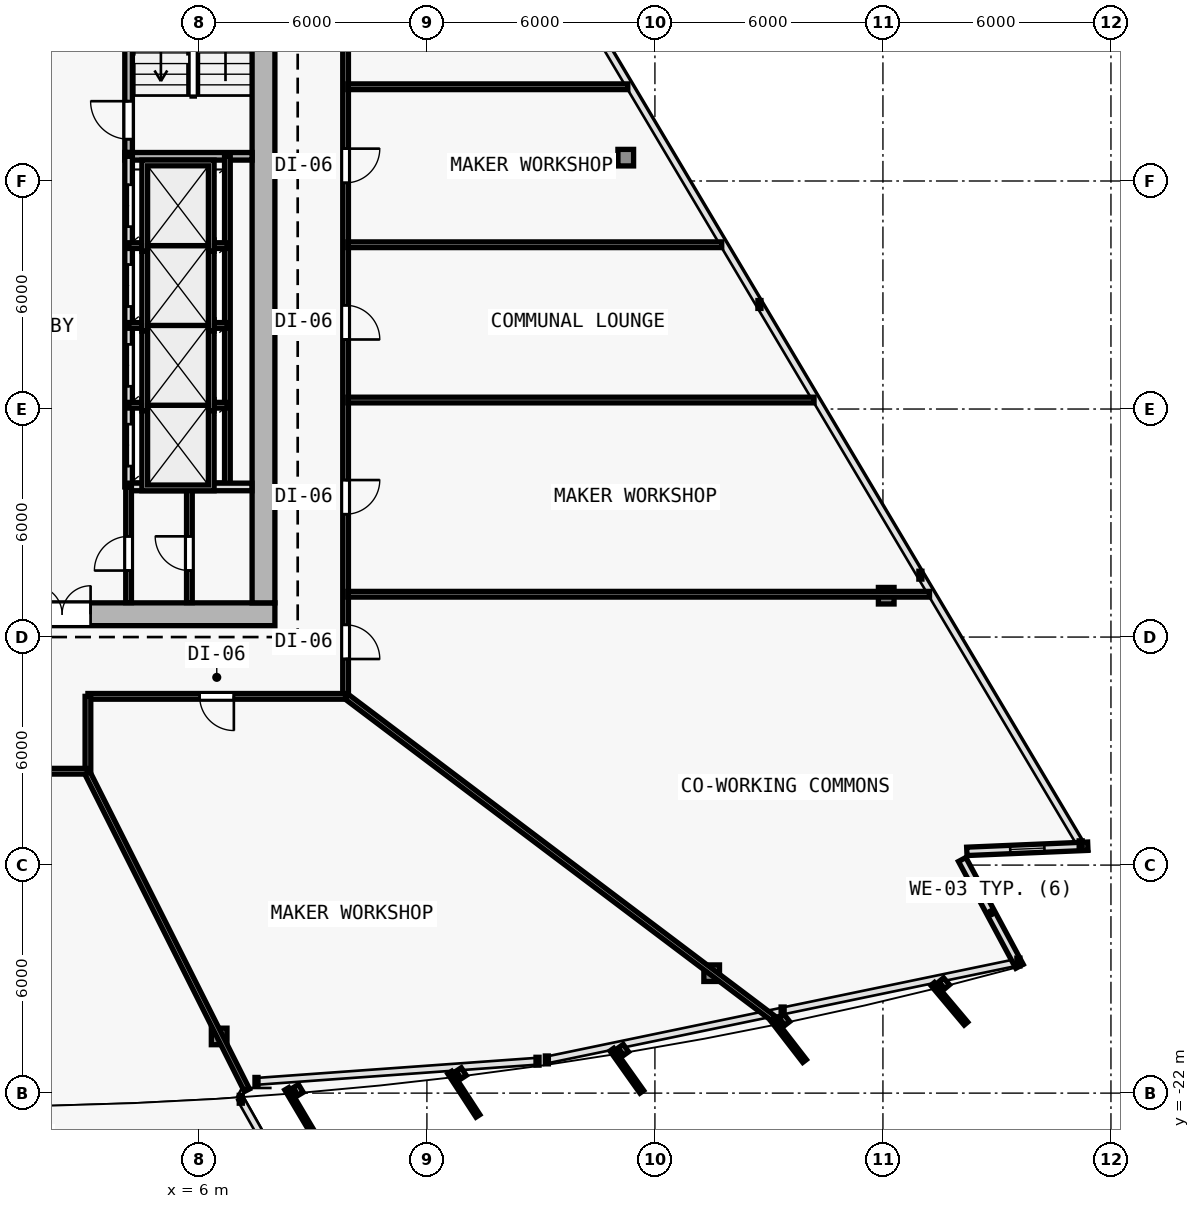
"""IFC4 building model, lengths in metres.
Left out: names, types, materials, properties, quantities, classifications, styles, units other than length and angle.
Written with IfcOpenShell. Run it as: python <this file> out.ifc"""

import sys

from ifc_helpers import new_model, si_unit, direction, frame, frame_2d, origin, origin_2d, place, context, subcontext, project, spatial, rectangle, i_section, extrude, element, fill, save


model = new_model("IFC4")
c1 = context("Model", 3, precision=1e-05, world=origin(), true_north=direction((0.0, 1.0)))
c2 = subcontext(c1, "Body", "Model", "MODEL_VIEW")
j1 = project(units=[si_unit("LENGTHUNIT", "METRE"), si_unit("PLANEANGLEUNIT", "RADIAN")], contexts=[c1])
p1 = place(None, origin())
s1 = spatial("IfcSite", under=j1, at=p1, CompositionType="ELEMENT")
p2 = place(p1, origin())
s2 = spatial("IfcBuilding", under=s1, at=p2, CompositionType="ELEMENT")
p3 = place(p2, frame((0.0, 0.0, 69.6)))
s3 = spatial("IfcBuildingStorey", under=s2, at=p3, CompositionType="ELEMENT", Elevation=69.6)
for number, where, z_axis, x_axis in (
    (1, (7.7, -9.4, 0.0), (0.0, 0.0, 1.0), (1.0, 0.0, 0.0)),
    (2, (7.7, 0.4, 0.0), (0.0, 0.0, 1.0), (1.0, 0.0, 0.0)),
):
    element("IfcColumn", number, at=place(p3, frame(where, z_axis=z_axis, x_axis=x_axis)), inside=s3, PredefinedType="COLUMN", context=c2, shape_type="SweptSolid", body=[
        extrude(i_section(OverallWidth=0.416, OverallDepth=0.446, WebThickness=0.025, FlangeThickness=0.04, FilletRadius=0.015, at=origin_2d()), origin(), (0.0, 0.0, 1.0), 3.6),
    ])
p4 = place(p3, frame((6.533, -20.509, 0.005), z_axis=(-0.006865841702, 0.035280909339, 0.999353850072), x_axis=(-0.981585848295, -0.191021523464, 0.0)))
e3 = element("IfcColumn", 3, at=p4, inside=s3, PredefinedType="COLUMN", context=c2, shape_type="SweptSolid", body=[
    extrude(i_section(OverallWidth=0.412, OverallDepth=0.435, WebThickness=0.023, FlangeThickness=0.037, FilletRadius=0.015, at=origin_2d()), origin(), (0.0, 0.0, 1.0), 3.592),
])
p5 = place(p3, frame((19.494, -18.844, 0.005), z_axis=(-0.020594893987, 0.033509183946, 0.999226193078), x_axis=(-0.851954850327, -0.523615252838, 0.0)))
e4 = element("IfcColumn", 4, at=p5, inside=s3, PredefinedType="COLUMN", context=c2, shape_type="SweptSolid", body=[
    extrude(i_section(OverallWidth=0.412, OverallDepth=0.435, WebThickness=0.023, FlangeThickness=0.037, FilletRadius=0.015, at=origin_2d()), origin(), (0.0, 0.0, 1.0), 3.592),
])
p6 = place(p3, frame((24.086, -8.912, 0.005), z_axis=(-0.026105663043, 0.021618752208, 0.999425396871), x_axis=(-0.637813971185, -0.770190455771, 0.0)))
e5 = element("IfcColumn", 5, at=p6, inside=s3, PredefinedType="COLUMN", context=c2, shape_type="SweptSolid", body=[
    extrude(i_section(OverallWidth=0.412, OverallDepth=0.435, WebThickness=0.023, FlangeThickness=0.037, FilletRadius=0.015, at=origin_2d()), origin(), (0.0, 0.0, 1.0), 3.591),
])
p7 = place(p3, frame((17.233, 2.614, 0.005), z_axis=(-0.018906028715, 0.009589028952, 0.999775281052), x_axis=(-0.452339157861, -0.891845999187, 0.0)))
e6 = element("IfcColumn", 6, at=p7, inside=s3, PredefinedType="COLUMN", context=c2, shape_type="SweptSolid", body=[
    extrude(i_section(OverallWidth=0.412, OverallDepth=0.435, WebThickness=0.023, FlangeThickness=0.037, FilletRadius=0.015, at=origin_2d()), origin(), (0.0, 0.0, 1.0), 3.59),
])
p8 = place(p3, frame((26.086, -15.852, 0.0), z_axis=(0.0, 0.0, 1.0), x_axis=(0.472775670204, -0.881182821929, 0.0)))
e7 = element("IfcWall", 7, at=p8, inside=s3, PredefinedType="SOLIDWALL", context=c2, shape_type="SweptSolid", body=[
    extrude(rectangle(XDim=3.19, YDim=0.22, at=frame_2d((1.595, 0.0))), origin(), (0.0, 0.0, 1.0), 3.28),
])
p9 = place(p3, frame((29.391, -15.503, 0.0), z_axis=(0.0, 0.0, 1.0), x_axis=(-0.999095632957, -0.042519597906, 0.0)))
e8 = element("IfcWall", 8, at=p9, inside=s3, PredefinedType="SOLIDWALL", context=c2, shape_type="SweptSolid", body=[
    extrude(rectangle(XDim=3.187, YDim=0.22, at=frame_2d((1.593, 0.0))), origin(), (0.0, 0.0, 1.0), 3.28),
])
p10 = place(p9, frame((1.143, 0.0, 0.62)))
e9 = element("IfcOpeningElement", 9, at=p10, cuts=e8, PredefinedType="OPENING", context=c2, shape_type="SweptSolid", body=[
    extrude(rectangle(XDim=0.9, YDim=1.6, at=frame_2d((0.45, 0.8))), frame((0.0, 0.12, 0.0), z_axis=(0.0, -1.0, 0.0), x_axis=(1.0, 0.0, 0.0)), (0.0, 0.0, 1.0), 0.24),
])
p11 = place(p3, frame((-8.0, -9.4, 0.0), z_axis=(0.0, 0.0, 1.0), x_axis=(1.0, 0.0, 0.0)))
e10 = element("IfcWall", 10, at=p11, inside=s3, PredefinedType="SHEAR", context=c2, shape_type="SweptSolid", body=[
    extrude(rectangle(XDim=16.0, YDim=0.6, at=frame_2d((8.0, 0.0))), origin(), (0.0, 0.0, 1.0), 3.28),
])
p12 = place(p11, frame((9.65, 0.0, 0.0)))
e11 = element("IfcOpeningElement", 11, at=p12, cuts=e10, PredefinedType="OPENING", context=c2, shape_type="SweptSolid", body=[
    extrude(rectangle(XDim=1.5, YDim=2.2, at=frame_2d((0.75, 1.1))), frame((0.0, 0.31, 0.0), z_axis=(0.0, -1.0, 0.0), x_axis=(1.0, 0.0, 0.0)), (0.0, 0.0, 1.0), 0.62),
])
p13 = place(p3, frame((7.7, 9.9, 0.0), z_axis=(0.0, 0.0, 1.0), x_axis=(0.0, -1.0, 0.0)))
e12 = element("IfcWall", 12, at=p13, inside=s3, PredefinedType="SHEAR", context=c2, shape_type="SweptSolid", body=[
    extrude(rectangle(XDim=19.0, YDim=0.6, at=frame_2d((9.5, 0.0))), origin(), (0.0, 0.0, 1.0), 3.28),
])
p14 = place(p3, frame((4.15, 2.75, 0.0), z_axis=(0.0, 0.0, 1.0), x_axis=(0.0, 1.0, 0.0)))
e13 = element("IfcWall", 13, at=p14, inside=s3, PredefinedType="SOLIDWALL", context=c2, shape_type="SweptSolid", body=[
    extrude(rectangle(XDim=7.15, YDim=0.2, at=frame_2d((3.575, 0.0))), origin(), (0.0, 0.0, 1.0), 3.28),
])
p15 = place(p14, frame((0.35, 0.0, 0.0)))
e14 = element("IfcOpeningElement", 14, at=p15, cuts=e13, PredefinedType="OPENING", context=c2, shape_type="SweptSolid", body=[
    extrude(rectangle(XDim=1.0, YDim=2.15, at=frame_2d((0.5, 1.075))), frame((0.0, 0.11, 0.0), z_axis=(0.0, -1.0, 0.0), x_axis=(1.0, 0.0, 0.0)), (0.0, 0.0, 1.0), 0.22),
])
p16 = place(p3, frame((4.05, 2.65, 0.0), z_axis=(0.0, 0.0, 1.0), x_axis=(1.0, 0.0, 0.0)))
e15 = element("IfcWall", 15, at=p16, inside=s3, PredefinedType="SOLIDWALL", context=c2, shape_type="SweptSolid", body=[
    extrude(rectangle(XDim=3.35, YDim=0.2, at=frame_2d((1.675, 0.0))), origin(), (0.0, 0.0, 1.0), 3.28),
])
p17 = place(p3, frame((4.15, -6.05, 0.0), z_axis=(0.0, 0.0, 1.0), x_axis=(0.0, 1.0, 0.0)))
e16 = element("IfcWall", 16, at=p17, inside=s3, PredefinedType="SOLIDWALL", context=c2, shape_type="SweptSolid", body=[
    extrude(rectangle(XDim=8.7, YDim=0.2, at=frame_2d((4.35, 0.0))), origin(), (0.0, 0.0, 1.0), 3.28),
])
p18 = place(p17, frame((0.55, 0.0, 0.0)))
e17 = element("IfcOpeningElement", 17, at=p18, cuts=e16, PredefinedType="OPENING", context=c2, shape_type="SweptSolid", body=[
    extrude(rectangle(XDim=1.1, YDim=2.15, at=frame_2d((0.55, 1.075))), frame((0.0, 0.11, 0.0), z_axis=(0.0, -1.0, 0.0), x_axis=(1.0, 0.0, 0.0)), (0.0, 0.0, 1.0), 0.22),
])
p19 = place(p17, frame((2.65, 0.0, 0.0)))
e18 = element("IfcOpeningElement", 18, at=p19, cuts=e16, PredefinedType="OPENING", context=c2, shape_type="SweptSolid", body=[
    extrude(rectangle(XDim=1.1, YDim=2.15, at=frame_2d((0.55, 1.075))), frame((0.0, 0.11, 0.0), z_axis=(0.0, -1.0, 0.0), x_axis=(1.0, 0.0, 0.0)), (0.0, 0.0, 1.0), 0.22),
])
p20 = place(p17, frame((4.75, 0.0, 0.0)))
e19 = element("IfcOpeningElement", 19, at=p20, cuts=e16, PredefinedType="OPENING", context=c2, shape_type="SweptSolid", body=[
    extrude(rectangle(XDim=1.1, YDim=2.15, at=frame_2d((0.55, 1.075))), frame((0.0, 0.11, 0.0), z_axis=(0.0, -1.0, 0.0), x_axis=(1.0, 0.0, 0.0)), (0.0, 0.0, 1.0), 0.22),
])
p21 = place(p17, frame((6.85, 0.0, 0.0)))
e20 = element("IfcOpeningElement", 20, at=p21, cuts=e16, PredefinedType="OPENING", context=c2, shape_type="SweptSolid", body=[
    extrude(rectangle(XDim=1.1, YDim=2.15, at=frame_2d((0.55, 1.075))), frame((0.0, 0.11, 0.0), z_axis=(0.0, -1.0, 0.0), x_axis=(1.0, 0.0, 0.0)), (0.0, 0.0, 1.0), 0.22),
])
p22 = place(p3, frame((6.75, -6.05, 0.0), z_axis=(0.0, 0.0, 1.0), x_axis=(0.0, 1.0, 0.0)))
e21 = element("IfcWall", 21, at=p22, inside=s3, PredefinedType="PARTITIONING", context=c2, shape_type="SweptSolid", body=[
    extrude(rectangle(XDim=8.7, YDim=0.15, at=frame_2d((4.35, 0.0))), origin(), (0.0, 0.0, 1.0), 3.28),
])
for number, where, z_axis, x_axis in (
    (22, (4.15, -3.9, 0.0), (0.0, 0.0, 1.0), (1.0, 0.0, 0.0)),
    (23, (4.15, -1.8, 0.0), (0.0, 0.0, 1.0), (1.0, 0.0, 0.0)),
    (24, (4.15, 0.3, 0.0), (0.0, 0.0, 1.0), (1.0, 0.0, 0.0)),
):
    element("IfcWall", number, at=place(p3, frame(where, z_axis=z_axis, x_axis=x_axis)), inside=s3, PredefinedType="PARTITIONING", context=c2, shape_type="SweptSolid", body=[
        extrude(rectangle(XDim=2.6, YDim=0.15, at=frame_2d((1.3, 0.0))), origin(), (0.0, 0.0, 1.0), 3.28),
    ])
p23 = place(p3, frame((4.15, -6.05, 0.0), z_axis=(0.0, 0.0, 1.0), x_axis=(1.0, 0.0, 0.0)))
e25 = element("IfcWall", 25, at=p23, inside=s3, PredefinedType="SOLIDWALL", context=c2, shape_type="SweptSolid", body=[
    extrude(rectangle(XDim=3.245, YDim=0.2, at=frame_2d((1.623, 0.0))), origin(), (0.0, 0.0, 1.0), 3.28),
])
p24 = place(p3, frame((4.15, -9.095, 0.0), z_axis=(0.0, 0.0, 1.0), x_axis=(0.0, 1.0, 0.0)))
e26 = element("IfcWall", 26, at=p24, inside=s3, PredefinedType="PARTITIONING", context=c2, shape_type="SweptSolid", body=[
    extrude(rectangle(XDim=3.045, YDim=0.15, at=frame_2d((1.522, 0.0))), origin(), (0.0, 0.0, 1.0), 3.28),
])
p25 = place(p24, frame((0.845, 0.0, 0.0)))
e27 = element("IfcOpeningElement", 27, at=p25, cuts=e26, PredefinedType="OPENING", context=c2, shape_type="SweptSolid", body=[
    extrude(rectangle(XDim=0.9, YDim=2.1, at=frame_2d((0.45, 1.05))), frame((0.0, 0.085, 0.0), z_axis=(0.0, -1.0, 0.0), x_axis=(1.0, 0.0, 0.0)), (0.0, 0.0, 1.0), 0.17),
])
p26 = place(p3, frame((5.75, -9.095, 0.0), z_axis=(0.0, 0.0, 1.0), x_axis=(0.0, 1.0, 0.0)))
e28 = element("IfcWall", 28, at=p26, inside=s3, PredefinedType="PARTITIONING", context=c2, shape_type="SweptSolid", body=[
    extrude(rectangle(XDim=3.045, YDim=0.15, at=frame_2d((1.522, 0.0))), origin(), (0.0, 0.0, 1.0), 3.28),
])
p27 = place(p26, frame((0.845, 0.0, 0.0)))
e29 = element("IfcOpeningElement", 29, at=p27, cuts=e28, PredefinedType="OPENING", context=c2, shape_type="SweptSolid", body=[
    extrude(rectangle(XDim=0.9, YDim=2.1, at=frame_2d((0.45, 1.05))), frame((0.0, 0.085, 0.0), z_axis=(0.0, -1.0, 0.0), x_axis=(1.0, 0.0, 0.0)), (0.0, 0.0, 1.0), 0.17),
])
p28 = place(p3, frame((9.86, 8.426, 0.0), z_axis=(0.0, 0.0, 1.0), x_axis=(0.0, -1.0, 0.0)))
e30 = element("IfcWall", 30, at=p28, inside=s3, PredefinedType="PARTITIONING", context=c2, shape_type="SweptSolid", body=[
    extrude(rectangle(XDim=19.986, YDim=0.15, at=frame_2d((9.993, 0.0))), origin(), (0.0, 0.0, 1.0), 2.539),
])
p29 = place(p28, frame((18.103, 0.0, 0.0)))
e31 = element("IfcOpeningElement", 31, at=p29, cuts=e30, PredefinedType="OPENING", context=c2, shape_type="SweptSolid", body=[
    extrude(rectangle(XDim=0.9, YDim=2.1, at=frame_2d((0.45, 1.05))), frame((0.0, 0.085, 0.0), z_axis=(0.0, -1.0, 0.0), x_axis=(1.0, 0.0, 0.0)), (0.0, 0.0, 1.0), 0.17),
])
p30 = place(p28, frame((14.294, 0.0, 0.0)))
e32 = element("IfcOpeningElement", 32, at=p30, cuts=e30, PredefinedType="OPENING", context=c2, shape_type="SweptSolid", body=[
    extrude(rectangle(XDim=0.9, YDim=2.1, at=frame_2d((0.45, 1.05))), frame((0.0, 0.085, 0.0), z_axis=(0.0, -1.0, 0.0), x_axis=(1.0, 0.0, 0.0)), (0.0, 0.0, 1.0), 0.17),
])
p31 = place(p28, frame((9.696, 0.0, 0.0)))
e33 = element("IfcOpeningElement", 33, at=p31, cuts=e30, PredefinedType="OPENING", context=c2, shape_type="SweptSolid", body=[
    extrude(rectangle(XDim=0.9, YDim=2.1, at=frame_2d((0.45, 1.05))), frame((0.0, 0.085, 0.0), z_axis=(0.0, -1.0, 0.0), x_axis=(1.0, 0.0, 0.0)), (0.0, 0.0, 1.0), 0.17),
])
p32 = place(p28, frame((5.574, 0.0, 0.0)))
e34 = element("IfcOpeningElement", 34, at=p32, cuts=e30, PredefinedType="OPENING", context=c2, shape_type="SweptSolid", body=[
    extrude(rectangle(XDim=0.9, YDim=2.1, at=frame_2d((0.45, 1.05))), frame((0.0, 0.085, 0.0), z_axis=(0.0, -1.0, 0.0), x_axis=(1.0, 0.0, 0.0)), (0.0, 0.0, 1.0), 0.17),
])
p33 = place(p28, frame((1.612, 0.0, 0.0)))
e35 = element("IfcOpeningElement", 35, at=p33, cuts=e30, PredefinedType="OPENING", context=c2, shape_type="SweptSolid", body=[
    extrude(rectangle(XDim=0.9, YDim=2.1, at=frame_2d((0.45, 1.05))), frame((0.0, 0.085, 0.0), z_axis=(0.0, -1.0, 0.0), x_axis=(1.0, 0.0, 0.0)), (0.0, 0.0, 1.0), 0.17),
])
p34 = place(p3, frame((9.86, -11.56, 0.0), z_axis=(0.0, 0.0, 1.0), x_axis=(-1.0, 0.0, 0.0)))
e36 = element("IfcWall", 36, at=p34, inside=s3, PredefinedType="PARTITIONING", context=c2, shape_type="SweptSolid", body=[
    extrude(rectangle(XDim=6.78, YDim=0.15, at=frame_2d((3.39, 0.0))), origin(), (0.0, 0.0, 1.0), 3.28),
])
p35 = place(p34, frame((2.94, 0.0, 0.0)))
e37 = element("IfcOpeningElement", 37, at=p35, cuts=e36, PredefinedType="OPENING", context=c2, shape_type="SweptSolid", body=[
    extrude(rectangle(XDim=0.9, YDim=2.1, at=frame_2d((0.45, 1.05))), frame((0.0, 0.085, 0.0), z_axis=(0.0, -1.0, 0.0), x_axis=(1.0, 0.0, 0.0)), (0.0, 0.0, 1.0), 0.17),
])
p36 = place(p3, frame((3.08, -11.56, 0.0), z_axis=(0.0, 0.0, 1.0), x_axis=(0.0, -1.0, 0.0)))
e38 = element("IfcWall", 38, at=p36, inside=s3, PredefinedType="PARTITIONING", context=c2, shape_type="SweptSolid", body=[
    extrude(rectangle(XDim=1.97, YDim=0.15, at=frame_2d((0.985, 0.0))), origin(), (0.0, 0.0, 1.0), 2.895),
])
p37 = place(p3, frame((3.08, -13.53, 0.0), z_axis=(0.0, 0.0, 1.0), x_axis=(-1.0, 0.0, 0.0)))
e39 = element("IfcWall", 39, at=p37, inside=s3, PredefinedType="PARTITIONING", context=c2, shape_type="SweptSolid", body=[
    extrude(rectangle(XDim=6.16, YDim=0.15, at=frame_2d((3.08, 0.0))), origin(), (0.0, 0.0, 1.0), 2.655),
])
p38 = place(p37, frame((2.63, 0.0, 0.0)))
e40 = element("IfcOpeningElement", 40, at=p38, cuts=e39, PredefinedType="OPENING", context=c2, shape_type="SweptSolid", body=[
    extrude(rectangle(XDim=0.9, YDim=2.1, at=frame_2d((0.45, 1.05))), frame((0.0, 0.085, 0.0), z_axis=(0.0, -1.0, 0.0), x_axis=(1.0, 0.0, 0.0)), (0.0, 0.0, 1.0), 0.17),
])
p39 = place(p3, frame((3.066, -13.573, 0.0), z_axis=(0.0, 0.0, 1.0), x_axis=(0.449176702064, -0.893442941839, 0.0)))
e41 = element("IfcWall", 41, at=p39, inside=s3, PredefinedType="PARTITIONING", context=c2, shape_type="SweptSolid", body=[
    extrude(rectangle(XDim=9.347, YDim=0.15, at=frame_2d((4.674, 0.0))), origin(), (0.0, 0.0, 1.0), 2.655),
])
p40 = place(p3, frame((9.888, -11.569, 0.0), z_axis=(0.0, 0.0, 1.0), x_axis=(0.79842261679, -0.602097438127, 0.0)))
e42 = element("IfcWall", 42, at=p40, inside=s3, PredefinedType="PARTITIONING", context=c2, shape_type="SweptSolid", body=[
    extrude(rectangle(XDim=14.066, YDim=0.15, at=frame_2d((7.033, 0.0))), origin(), (0.0, 0.0, 1.0), 2.655),
])
p41 = place(p3, frame((9.92, -8.873, 0.0), z_axis=(0.0, 0.0, 1.0), x_axis=(1.0, 0.0, 0.0)))
e43 = element("IfcWall", 43, at=p41, inside=s3, PredefinedType="PARTITIONING", context=c2, shape_type="SweptSolid", body=[
    extrude(rectangle(XDim=15.306, YDim=0.15, at=frame_2d((7.653, 0.0))), origin(), (0.0, 0.0, 1.0), 2.539),
])
p42 = place(p3, frame((9.92, 0.323, 0.0), z_axis=(0.0, 0.0, 1.0), x_axis=(1.0, 0.0, 0.0)))
e44 = element("IfcWall", 44, at=p42, inside=s3, PredefinedType="PARTITIONING", context=c2, shape_type="SweptSolid", body=[
    extrude(rectangle(XDim=9.838, YDim=0.15, at=frame_2d((4.919, 0.0))), origin(), (0.0, 0.0, 1.0), 2.765),
])
p43 = place(p3, frame((9.92, -3.763, 0.0), z_axis=(0.0, 0.0, 1.0), x_axis=(1.0, 0.0, 0.0)))
e45 = element("IfcWall", 45, at=p43, inside=s3, PredefinedType="PARTITIONING", context=c2, shape_type="SweptSolid", body=[
    extrude(rectangle(XDim=12.267, YDim=0.15, at=frame_2d((6.134, 0.0))), origin(), (0.0, 0.0, 1.0), 2.765),
])
p44 = place(p3, frame((9.92, 4.48, 0.0), z_axis=(0.0, 0.0, 1.0), x_axis=(1.0, 0.0, 0.0)))
e46 = element("IfcWall", 46, at=p44, inside=s3, PredefinedType="PARTITIONING", context=c2, shape_type="SweptSolid", body=[
    extrude(rectangle(XDim=7.366, YDim=0.15, at=frame_2d((3.683, 0.0))), origin(), (0.0, 0.0, 1.0), 2.765),
])
p45 = place(p10, origin())
e47 = element("IfcWindow", 47, at=p45, inside=s3, PartitioningType="SINGLE_PANEL", PredefinedType="WINDOW", context=c2, shape_type="SweptSolid", body=[
    extrude(rectangle(XDim=0.9, YDim=1.6, at=frame_2d((0.45, 0.8))), frame((0.0, 0.03, 0.0), z_axis=(0.0, -1.0, 0.0), x_axis=(1.0, 0.0, 0.0)), (0.0, 0.0, 1.0), 0.06),
])
fill(e9, e47)
p46 = place(p12, origin())
e48 = element("IfcDoor", 48, at=p46, inside=s3, OperationType="DOUBLE_DOOR_SINGLE_SWING", PredefinedType="DOOR", context=c2, shape_type="SweptSolid", body=[
    extrude(rectangle(XDim=1.5, YDim=2.2, at=frame_2d((0.75, 1.1))), frame((0.0, 0.025, 0.0), z_axis=(0.0, -1.0, 0.0), x_axis=(1.0, 0.0, 0.0)), (0.0, 0.0, 1.0), 0.05),
])
fill(e11, e48)
p47 = place(p15, origin())
e49 = element("IfcDoor", 49, at=p47, inside=s3, OperationType="SINGLE_SWING_RIGHT", PredefinedType="DOOR", context=c2, shape_type="SweptSolid", body=[
    extrude(rectangle(XDim=1.0, YDim=2.15, at=frame_2d((0.5, 1.075))), frame((0.0, 0.025, 0.0), z_axis=(0.0, -1.0, 0.0), x_axis=(1.0, 0.0, 0.0)), (0.0, 0.0, 1.0), 0.05),
])
fill(e14, e49)
p48 = place(p18, origin())
e50 = element("IfcDoor", 50, at=p48, inside=s3, OperationType="DOUBLE_DOOR_SLIDING", PredefinedType="DOOR", context=c2, shape_type="SweptSolid", body=[
    extrude(rectangle(XDim=1.1, YDim=2.15, at=frame_2d((0.55, 1.075))), frame((0.0, 0.025, 0.0), z_axis=(0.0, -1.0, 0.0), x_axis=(1.0, 0.0, 0.0)), (0.0, 0.0, 1.0), 0.05),
])
fill(e17, e50)
p49 = place(p19, origin())
e51 = element("IfcDoor", 51, at=p49, inside=s3, OperationType="DOUBLE_DOOR_SLIDING", PredefinedType="DOOR", context=c2, shape_type="SweptSolid", body=[
    extrude(rectangle(XDim=1.1, YDim=2.15, at=frame_2d((0.55, 1.075))), frame((0.0, 0.025, 0.0), z_axis=(0.0, -1.0, 0.0), x_axis=(1.0, 0.0, 0.0)), (0.0, 0.0, 1.0), 0.05),
])
fill(e18, e51)
p50 = place(p20, origin())
e52 = element("IfcDoor", 52, at=p50, inside=s3, OperationType="DOUBLE_DOOR_SLIDING", PredefinedType="DOOR", context=c2, shape_type="SweptSolid", body=[
    extrude(rectangle(XDim=1.1, YDim=2.15, at=frame_2d((0.55, 1.075))), frame((0.0, 0.025, 0.0), z_axis=(0.0, -1.0, 0.0), x_axis=(1.0, 0.0, 0.0)), (0.0, 0.0, 1.0), 0.05),
])
fill(e19, e52)
p51 = place(p21, origin())
e53 = element("IfcDoor", 53, at=p51, inside=s3, OperationType="DOUBLE_DOOR_SLIDING", PredefinedType="DOOR", context=c2, shape_type="SweptSolid", body=[
    extrude(rectangle(XDim=1.1, YDim=2.15, at=frame_2d((0.55, 1.075))), frame((0.0, 0.025, 0.0), z_axis=(0.0, -1.0, 0.0), x_axis=(1.0, 0.0, 0.0)), (0.0, 0.0, 1.0), 0.05),
])
fill(e20, e53)
p52 = place(p25, origin())
e54 = element("IfcDoor", 54, at=p52, inside=s3, OperationType="SINGLE_SWING_LEFT", PredefinedType="DOOR", context=c2, shape_type="SweptSolid", body=[
    extrude(rectangle(XDim=0.9, YDim=2.1, at=frame_2d((0.45, 1.05))), frame((0.0, 0.025, 0.0), z_axis=(0.0, -1.0, 0.0), x_axis=(1.0, 0.0, 0.0)), (0.0, 0.0, 1.0), 0.05),
])
fill(e27, e54)
p53 = place(p27, origin())
e55 = element("IfcDoor", 55, at=p53, inside=s3, OperationType="SINGLE_SWING_RIGHT", PredefinedType="DOOR", context=c2, shape_type="SweptSolid", body=[
    extrude(rectangle(XDim=0.9, YDim=2.1, at=frame_2d((0.45, 1.05))), frame((0.0, 0.025, 0.0), z_axis=(0.0, -1.0, 0.0), x_axis=(1.0, 0.0, 0.0)), (0.0, 0.0, 1.0), 0.05),
])
fill(e29, e55)
p54 = place(p35, origin())
e56 = element("IfcDoor", 56, at=p54, inside=s3, OperationType="SINGLE_SWING_LEFT", PredefinedType="DOOR", context=c2, shape_type="SweptSolid", body=[
    extrude(rectangle(XDim=0.9, YDim=2.1, at=frame_2d((0.45, 1.05))), frame((0.0, 0.025, 0.0), z_axis=(0.0, -1.0, 0.0), x_axis=(1.0, 0.0, 0.0)), (0.0, 0.0, 1.0), 0.05),
])
fill(e37, e56)
p55 = place(p29, origin())
e57 = element("IfcDoor", 57, at=p55, inside=s3, OperationType="SINGLE_SWING_RIGHT", PredefinedType="DOOR", context=c2, shape_type="SweptSolid", body=[
    extrude(rectangle(XDim=0.9, YDim=2.1, at=frame_2d((0.45, 1.05))), frame((0.0, 0.025, 0.0), z_axis=(0.0, -1.0, 0.0), x_axis=(1.0, 0.0, 0.0)), (0.0, 0.0, 1.0), 0.05),
])
fill(e31, e57)
p56 = place(p30, origin())
e58 = element("IfcDoor", 58, at=p56, inside=s3, OperationType="SINGLE_SWING_LEFT", PredefinedType="DOOR", context=c2, shape_type="SweptSolid", body=[
    extrude(rectangle(XDim=0.9, YDim=2.1, at=frame_2d((0.45, 1.05))), frame((0.0, 0.025, 0.0), z_axis=(0.0, -1.0, 0.0), x_axis=(1.0, 0.0, 0.0)), (0.0, 0.0, 1.0), 0.05),
])
fill(e32, e58)
p57 = place(p31, origin())
e59 = element("IfcDoor", 59, at=p57, inside=s3, OperationType="SINGLE_SWING_RIGHT", PredefinedType="DOOR", context=c2, shape_type="SweptSolid", body=[
    extrude(rectangle(XDim=0.9, YDim=2.1, at=frame_2d((0.45, 1.05))), frame((0.0, 0.025, 0.0), z_axis=(0.0, -1.0, 0.0), x_axis=(1.0, 0.0, 0.0)), (0.0, 0.0, 1.0), 0.05),
])
fill(e33, e59)
p58 = place(p32, origin())
e60 = element("IfcDoor", 60, at=p58, inside=s3, OperationType="SINGLE_SWING_LEFT", PredefinedType="DOOR", context=c2, shape_type="SweptSolid", body=[
    extrude(rectangle(XDim=0.9, YDim=2.1, at=frame_2d((0.45, 1.05))), frame((0.0, 0.025, 0.0), z_axis=(0.0, -1.0, 0.0), x_axis=(1.0, 0.0, 0.0)), (0.0, 0.0, 1.0), 0.05),
])
fill(e34, e60)
save(model, sys.argv[1])
